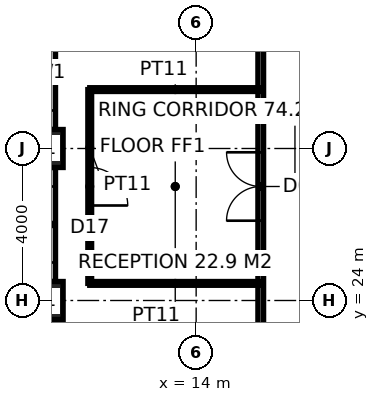
"""IFC4 building model, lengths in metres.
Left out: names, types, materials, properties, quantities, classifications, styles, units other than length and angle.
Written with IfcOpenShell. Run it as: python <this file> out.ifc"""

import sys

from ifc_helpers import new_model, si_unit, direction, frame, frame_2d, origin, origin_2d, place, context, subcontext, project, spatial, rectangle, hollow_rectangle, extrude, element, fill, save


model = new_model("IFC4")
c1 = context("Model", 3, precision=1e-05, world=origin(), true_north=direction((0.0, 1.0)))
c2 = subcontext(c1, "Body", "Model", "MODEL_VIEW")
j1 = project(units=[si_unit("LENGTHUNIT", "METRE"), si_unit("PLANEANGLEUNIT", "RADIAN")], contexts=[c1])
p1 = place(None, origin())
s1 = spatial("IfcSite", under=j1, at=p1, CompositionType="ELEMENT")
p2 = place(p1, origin())
s2 = spatial("IfcBuilding", under=s1, at=p2, CompositionType="ELEMENT")
p3 = place(p2, frame((0.0, 0.0, 93.4)))
s3 = spatial("IfcBuildingStorey", under=s2, at=p3, CompositionType="ELEMENT", Elevation=93.4)
for number, where, z_axis, x_axis in (
    (1, (10.0, 24.0, 0.0), (0.0, 0.0, 1.0), (1.0, 0.0, 0.0)),
    (2, (10.0, 28.0, 0.0), (0.0, 0.0, 1.0), (1.0, 0.0, 0.0)),
):
    element("IfcColumn", number, at=place(p3, frame(where, z_axis=z_axis, x_axis=x_axis)), inside=s3, PredefinedType="COLUMN", context=c2, shape_type="SweptSolid", body=[
        extrude(hollow_rectangle(XDim=1.0, YDim=1.0, WallThickness=0.1, at=origin_2d()), origin(), (0.0, 0.0, 1.0), 4.0),
    ])
p4 = place(p3, frame((15.7, 15.625, 0.0), z_axis=(0.0, 0.0, 1.0), x_axis=(0.0, 1.0, 0.0)))
e3 = element("IfcWall", 3, at=p4, inside=s3, PredefinedType="PARTITIONING", context=c2, shape_type="SweptSolid", body=[
    extrude(rectangle(XDim=22.75, YDim=0.15, at=frame_2d((11.375, 0.0))), origin(), (0.0, 0.0, 1.0), 3.85),
])
p5 = place(p4, frame((10.475, 0.0, 0.0)))
e4 = element("IfcOpeningElement", 4, at=p5, cuts=e3, PredefinedType="OPENING", context=c2, shape_type="SweptSolid", body=[
    extrude(rectangle(XDim=1.8, YDim=2.4, at=frame_2d((0.9, 1.2))), frame((0.0, 0.085, 0.0), z_axis=(0.0, -1.0, 0.0), x_axis=(1.0, 0.0, 0.0)), (0.0, 0.0, 1.0), 0.17),
])
p6 = place(p3, frame((15.7, 29.55, 0.0), z_axis=(0.0, 0.0, 1.0), x_axis=(-1.0, 0.0, 0.0)))
e5 = element("IfcWall", 5, at=p6, inside=s3, PredefinedType="PARTITIONING", context=c2, shape_type="SweptSolid", body=[
    extrude(rectangle(XDim=4.5, YDim=0.1, at=frame_2d((2.25, 0.0))), origin(), (0.0, 0.0, 1.0), 3.85),
])
p7 = place(p3, frame((11.2, 29.55, 0.0), z_axis=(0.0, 0.0, 1.0), x_axis=(0.0, -1.0, 0.0)))
e6 = element("IfcWall", 6, at=p7, inside=s3, PredefinedType="PARTITIONING", context=c2, shape_type="SweptSolid", body=[
    extrude(rectangle(XDim=5.1, YDim=0.1, at=frame_2d((2.55, 0.0))), origin(), (0.0, 0.0, 1.0), 3.85),
])
p8 = place(p7, frame((2.05, 0.0, 0.0)))
e7 = element("IfcOpeningElement", 7, at=p8, cuts=e6, PredefinedType="OPENING", context=c2, shape_type="SweptSolid", body=[
    extrude(rectangle(XDim=1.0, YDim=2.2, at=frame_2d((0.5, 1.1))), frame((0.0, 0.06, 0.0), z_axis=(0.0, -1.0, 0.0), x_axis=(1.0, 0.0, 0.0)), (0.0, 0.0, 1.0), 0.12),
])
p9 = place(p3, frame((11.2, 24.45, 0.0), z_axis=(0.0, 0.0, 1.0), x_axis=(1.0, 0.0, 0.0)))
e8 = element("IfcWall", 8, at=p9, inside=s3, PredefinedType="PARTITIONING", context=c2, shape_type="SweptSolid", body=[
    extrude(rectangle(XDim=4.5, YDim=0.1, at=frame_2d((2.25, 0.0))), origin(), (0.0, 0.0, 1.0), 2.95),
])
p10 = place(p3, frame((10.15, 23.5, 0.0), z_axis=(0.0, 0.0, 1.0), x_axis=(0.0, -1.0, 0.0)))
e9 = element("IfcWall", 9, at=p10, inside=s3, PredefinedType="ELEMENTEDWALL", context=c2, shape_type="SweptSolid", body=[
    extrude(rectangle(XDim=3.0, YDim=0.3, at=frame_2d((1.5, 0.0))), origin(), (0.0, 0.0, 1.0), 2.85),
])
p11 = place(p10, frame((0.5, 0.0, 0.8)))
e10 = element("IfcOpeningElement", 10, at=p11, cuts=e9, PredefinedType="OPENING", context=c2, shape_type="SweptSolid", body=[
    extrude(rectangle(XDim=2.0, YDim=2.0, at=frame_2d((1.0, 1.0))), frame((0.0, 0.16, 0.0), z_axis=(0.0, -1.0, 0.0), x_axis=(1.0, 0.0, 0.0)), (0.0, 0.0, 1.0), 0.32),
])
p12 = place(p3, frame((10.15, 27.5, 0.0), z_axis=(0.0, 0.0, 1.0), x_axis=(0.0, -1.0, 0.0)))
e11 = element("IfcWall", 11, at=p12, inside=s3, PredefinedType="ELEMENTEDWALL", context=c2, shape_type="SweptSolid", body=[
    extrude(rectangle(XDim=3.0, YDim=0.3, at=frame_2d((1.5, 0.0))), origin(), (0.0, 0.0, 1.0), 2.85),
])
p13 = place(p12, frame((0.5, 0.0, 0.8)))
e12 = element("IfcOpeningElement", 12, at=p13, cuts=e11, PredefinedType="OPENING", context=c2, shape_type="SweptSolid", body=[
    extrude(rectangle(XDim=2.0, YDim=2.0, at=frame_2d((1.0, 1.0))), frame((0.0, 0.16, 0.0), z_axis=(0.0, -1.0, 0.0), x_axis=(1.0, 0.0, 0.0)), (0.0, 0.0, 1.0), 0.32),
])
p14 = place(p3, frame((10.15, 31.5, 0.0), z_axis=(0.0, 0.0, 1.0), x_axis=(0.0, -1.0, 0.0)))
e13 = element("IfcWall", 13, at=p14, inside=s3, PredefinedType="ELEMENTEDWALL", context=c2, shape_type="SweptSolid", body=[
    extrude(rectangle(XDim=3.0, YDim=0.3, at=frame_2d((1.5, 0.0))), origin(), (0.0, 0.0, 1.0), 2.85),
])
p15 = place(p14, frame((0.5, 0.0, 0.8)))
e14 = element("IfcOpeningElement", 14, at=p15, cuts=e13, PredefinedType="OPENING", context=c2, shape_type="SweptSolid", body=[
    extrude(rectangle(XDim=2.0, YDim=2.0, at=frame_2d((1.0, 1.0))), frame((0.0, 0.16, 0.0), z_axis=(0.0, -1.0, 0.0), x_axis=(1.0, 0.0, 0.0)), (0.0, 0.0, 1.0), 0.32),
])
p16 = place(p5, origin())
e15 = element("IfcDoor", 15, at=p16, inside=s3, OperationType="DOUBLE_DOOR_DOUBLE_SWING", PredefinedType="DOOR", context=c2, shape_type="SweptSolid", body=[
    extrude(rectangle(XDim=1.8, YDim=2.4, at=frame_2d((0.9, 1.2))), frame((0.0, 0.025, 0.0), z_axis=(0.0, -1.0, 0.0), x_axis=(1.0, 0.0, 0.0)), (0.0, 0.0, 1.0), 0.05),
])
fill(e4, e15)
p17 = place(p8, origin())
e16 = element("IfcDoor", 16, at=p17, inside=s3, OperationType="SINGLE_SWING_RIGHT", PredefinedType="DOOR", context=c2, shape_type="SweptSolid", body=[
    extrude(rectangle(XDim=1.0, YDim=2.2, at=frame_2d((0.5, 1.1))), frame((0.0, 0.025, 0.0), z_axis=(0.0, -1.0, 0.0), x_axis=(1.0, 0.0, 0.0)), (0.0, 0.0, 1.0), 0.05),
])
fill(e7, e16)
save(model, sys.argv[1])
